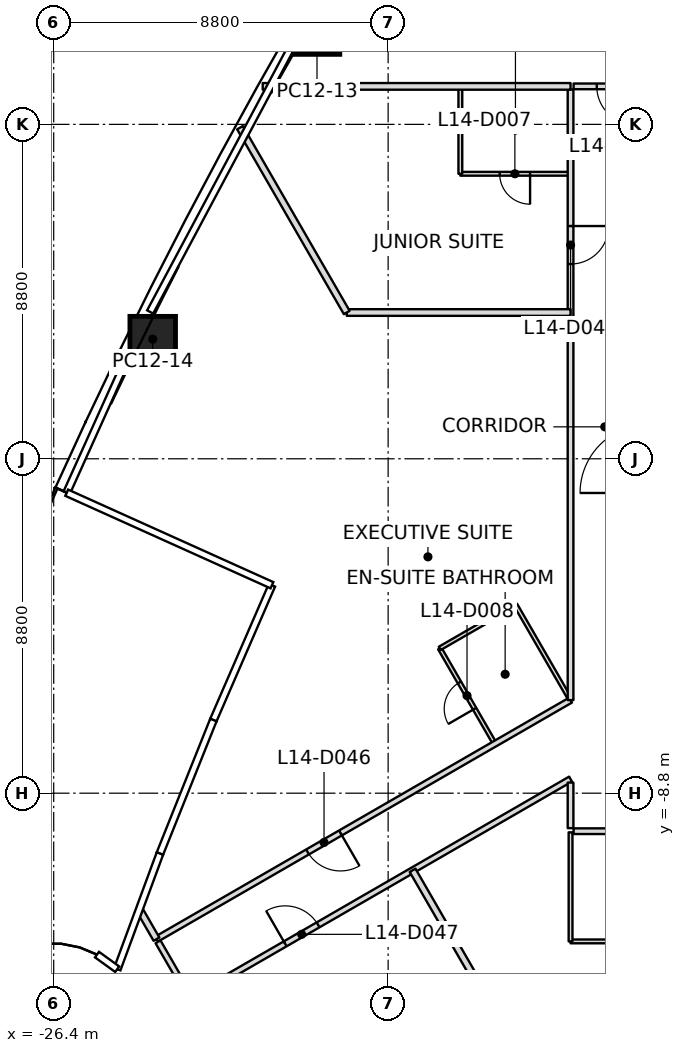
"""IFC4 building model, lengths in metres.
Left out: names, types, materials, properties, quantities, classifications, styles, units other than length and angle.
Written with IfcOpenShell. Run it as: python <this file> out.ifc"""

import sys

from ifc_helpers import new_model, si_unit, direction, frame, frame_2d, origin, origin_2d, place, context, subcontext, project, spatial, rectangle, extrude, element, fill, save


model = new_model("IFC4")
c1 = context("Model", 3, precision=1e-05, world=origin(), true_north=direction((0.0, 1.0)))
c2 = subcontext(c1, "Body", "Model", "MODEL_VIEW")
j1 = project(units=[si_unit("LENGTHUNIT", "METRE"), si_unit("PLANEANGLEUNIT", "RADIAN")], contexts=[c1])
p1 = place(None, origin())
s1 = spatial("IfcSite", under=j1, at=p1, CompositionType="ELEMENT")
p2 = place(p1, origin())
s2 = spatial("IfcBuilding", under=s1, at=p2, CompositionType="ELEMENT")
p3 = place(p2, frame((0.0, 0.0, 73.9)))
s3 = spatial("IfcBuildingStorey", under=s2, at=p3, CompositionType="ELEMENT", Elevation=73.9)
p4 = place(p3, frame((-19.472, 11.242, 0.0), z_axis=(0.010688020009, -0.006201690622, 0.999923649716), x_axis=(0.499971440741, 0.866041891424, 2.7221193e-05)))
e1 = element("IfcColumn", 1, at=p4, inside=s3, PredefinedType="COLUMN", context=c2, shape_type="SweptSolid", body=[
    extrude(rectangle(XDim=1.2, YDim=1.2, at=origin_2d()), origin(), (0.0, 0.0, 1.0), 3.7),
])
p5 = place(p3, frame((-23.795, 3.148, 0.0), z_axis=(0.015371594408, 0.002243065278, 0.999879334092), x_axis=(0.441566424908, 0.897185395141, -0.008801087387)))
e2 = element("IfcColumn", 2, at=p5, inside=s3, PredefinedType="COLUMN", context=c2, shape_type="SweptSolid", body=[
    extrude(rectangle(XDim=1.2, YDim=1.2, at=origin_2d()), origin(), (0.0, 0.0, 1.0), 3.701),
])
p6 = place(p3, frame((-23.695, -12.641, 0.0), z_axis=(0.0, 0.0, 1.0), x_axis=(-0.500122219575, 0.86595482878, 0.0)))
e3 = element("IfcWall", 3, at=p6, inside=s3, PredefinedType="PARTITIONING", context=c2, shape_type="SweptSolid", body=[
    extrude(rectangle(XDim=0.916, YDim=0.175, at=frame_2d((0.458, 0.0))), origin(), (0.0, 0.0, 1.0), 3.15),
])
p7 = place(p3, frame((-12.8, 3.849, 0.0), z_axis=(0.0, 0.0, 1.0), x_axis=(-1.0, 0.0, 0.0)))
e4 = element("IfcWall", 4, at=p7, inside=s3, PredefinedType="PARTITIONING", context=c2, shape_type="SweptSolid", body=[
    extrude(rectangle(XDim=5.889, YDim=0.175, at=frame_2d((2.944, 0.0))), origin(), (0.0, 0.0, 1.0), 3.017),
])
p8 = place(p3, frame((-18.689, 3.849, 0.0), z_axis=(0.0, 0.0, 1.0), x_axis=(-0.49999586752, 0.86602778966, 0.0)))
e5 = element("IfcWall", 5, at=p8, inside=s3, PredefinedType="PARTITIONING", context=c2, shape_type="SweptSolid", body=[
    extrude(rectangle(XDim=5.617, YDim=0.175, at=frame_2d((2.808, 0.0))), origin(), (0.0, 0.0, 1.0), 2.934),
])
p9 = place(p3, frame((-12.8, 9.8, 0.0), z_axis=(0.0, 0.0, 1.0), x_axis=(-1.0, 0.0, 0.0)))
e6 = element("IfcWall", 6, at=p9, inside=s3, PredefinedType="PARTITIONING", context=c2, shape_type="SweptSolid", body=[
    extrude(rectangle(XDim=8.1, YDim=0.175, at=frame_2d((4.05, 0.0))), origin(), (0.0, 0.0, 1.0), 2.934),
])
p10 = place(p3, frame((-13.655, -16.549, 0.0), z_axis=(0.0, 0.0, 1.0), x_axis=(-0.499999794657, 0.866025522339, 0.0)))
e7 = element("IfcWall", 7, at=p10, inside=s3, PredefinedType="PARTITIONING", context=c2, shape_type="SweptSolid", body=[
    extrude(rectangle(XDim=6.604, YDim=0.175, at=frame_2d((3.302, 0.0))), origin(), (0.0, 0.0, 1.0), 2.797),
])
p11 = place(p3, frame((-12.8, -6.351, 0.0), z_axis=(0.0, 0.0, 1.0), x_axis=(-0.866020449901, -0.50000858028, 0.0)))
e8 = element("IfcWall", 8, at=p11, inside=s3, PredefinedType="PARTITIONING", context=c2, shape_type="SweptSolid", body=[
    extrude(rectangle(XDim=12.581, YDim=0.15, at=frame_2d((6.291, 0.0))), origin(), (0.0, 0.0, 1.0), 2.947),
])
p12 = place(p11, frame((6.99, 0.0, 0.0)))
e9 = element("IfcOpeningElement", 9, at=p12, cuts=e8, PredefinedType="OPENING", context=c2, shape_type="SweptSolid", body=[
    extrude(rectangle(XDim=1.0, YDim=2.1, at=frame_2d((0.5, 1.05))), frame((0.0, 0.075, 0.0), z_axis=(0.0, -1.0, 0.0), x_axis=(1.0, 0.0, 0.0)), (0.0, 0.0, 1.0), 0.15),
])
p13 = place(p3, frame((-23.656, -12.711, 0.0), z_axis=(0.0, 0.0, 1.0), x_axis=(0.500062383118, -0.865989383878, 0.0)))
e10 = element("IfcWall", 10, at=p13, inside=s3, PredefinedType="PARTITIONING", context=c2, shape_type="SweptSolid", body=[
    extrude(rectangle(XDim=1.72, YDim=0.15, at=frame_2d((0.86, 0.0))), origin(), (0.0, 0.0, 1.0), 2.797),
])
p14 = place(p3, frame((-22.726, -14.16, 0.0), z_axis=(0.0, 0.0, 1.0), x_axis=(0.866019223041, 0.500010705209, 0.0)))
e11 = element("IfcWall", 11, at=p14, inside=s3, PredefinedType="PARTITIONING", context=c2, shape_type="SweptSolid", body=[
    extrude(rectangle(XDim=11.462, YDim=0.15, at=frame_2d((5.731, 0.0))), origin(), (0.0, 0.0, 1.0), 2.797),
])
p15 = place(p14, frame((2.791, 0.0, 0.0)))
e12 = element("IfcOpeningElement", 12, at=p15, cuts=e11, PredefinedType="OPENING", context=c2, shape_type="SweptSolid", body=[
    extrude(rectangle(XDim=1.0, YDim=2.1, at=frame_2d((0.5, 1.05))), frame((0.0, 0.075, 0.0), z_axis=(0.0, -1.0, 0.0), x_axis=(1.0, 0.0, 0.0)), (0.0, 0.0, 1.0), 0.15),
])
p16 = place(p3, frame((-12.8, -8.521, 0.0), z_axis=(0.0, 0.0, 1.0), x_axis=(0.0, -1.0, 0.0)))
e13 = element("IfcWall", 13, at=p16, inside=s3, PredefinedType="PARTITIONING", context=c2, shape_type="SweptSolid", body=[
    extrude(rectangle(XDim=1.199, YDim=0.15, at=frame_2d((0.6, 0.0))), origin(), (0.0, 0.0, 1.0), 2.797),
])
p17 = place(p3, frame((-12.8, 9.72, 0.0), z_axis=(0.0, 0.0, 1.0), x_axis=(0.0, -1.0, 0.0)))
e14 = element("IfcWall", 14, at=p17, inside=s3, PredefinedType="PARTITIONING", context=c2, shape_type="SweptSolid", body=[
    extrude(rectangle(XDim=16.071, YDim=0.15, at=frame_2d((8.035, 0.0))), origin(), (0.0, 0.0, 1.0), 2.947),
])
p18 = place(p17, frame((3.595, 0.0, 0.0)))
e15 = element("IfcOpeningElement", 15, at=p18, cuts=e14, PredefinedType="OPENING", context=c2, shape_type="SweptSolid", body=[
    extrude(rectangle(XDim=1.0, YDim=2.1, at=frame_2d((0.5, 1.05))), frame((0.0, 0.075, 0.0), z_axis=(0.0, -1.0, 0.0), x_axis=(1.0, 0.0, 0.0)), (0.0, 0.0, 1.0), 0.15),
])
p19 = place(p3, frame((-12.72, -9.8, 0.0), z_axis=(0.0, 0.0, 1.0), x_axis=(1.0, 0.0, 0.0)))
e16 = element("IfcWall", 16, at=p19, inside=s3, PredefinedType="PARTITIONING", context=c2, shape_type="SweptSolid", body=[
    extrude(rectangle(XDim=25.44, YDim=0.15, at=frame_2d((12.72, 0.0))), origin(), (0.0, 0.0, 1.0), 2.947),
])
p20 = place(p19, frame((3.22, 0.0, 0.0)))
e17 = element("IfcOpeningElement", 17, at=p20, cuts=e16, PredefinedType="OPENING", context=c2, shape_type="SweptSolid", body=[
    extrude(rectangle(XDim=1.0, YDim=2.1, at=frame_2d((0.5, 1.05))), frame((0.0, 0.075, 0.0), z_axis=(0.0, -1.0, 0.0), x_axis=(1.0, 0.0, 0.0)), (0.0, 0.0, 1.0), 0.15),
])
p21 = place(p19, frame((8.22, 0.0, 0.0)))
e18 = element("IfcOpeningElement", 18, at=p21, cuts=e16, PredefinedType="OPENING", context=c2, shape_type="SweptSolid", body=[
    extrude(rectangle(XDim=1.0, YDim=2.1, at=frame_2d((0.5, 1.05))), frame((0.0, 0.075, 0.0), z_axis=(0.0, -1.0, 0.0), x_axis=(1.0, 0.0, 0.0)), (0.0, 0.0, 1.0), 0.15),
])
p22 = place(p19, frame((13.32, 0.0, 0.0)))
e19 = element("IfcOpeningElement", 19, at=p22, cuts=e16, PredefinedType="OPENING", context=c2, shape_type="SweptSolid", body=[
    extrude(rectangle(XDim=1.0, YDim=2.1, at=frame_2d((0.5, 1.05))), frame((0.0, 0.075, 0.0), z_axis=(0.0, -1.0, 0.0), x_axis=(1.0, 0.0, 0.0)), (0.0, 0.0, 1.0), 0.15),
])
p23 = place(p19, frame((18.72, 0.0, 0.0)))
e20 = element("IfcOpeningElement", 20, at=p23, cuts=e16, PredefinedType="OPENING", context=c2, shape_type="SweptSolid", body=[
    extrude(rectangle(XDim=1.0, YDim=2.1, at=frame_2d((0.5, 1.05))), frame((0.0, 0.075, 0.0), z_axis=(0.0, -1.0, 0.0), x_axis=(1.0, 0.0, 0.0)), (0.0, 0.0, 1.0), 0.15),
])
p24 = place(p19, frame((23.82, 0.0, 0.0)))
e21 = element("IfcOpeningElement", 21, at=p24, cuts=e16, PredefinedType="OPENING", context=c2, shape_type="SweptSolid", body=[
    extrude(rectangle(XDim=1.0, YDim=2.1, at=frame_2d((0.5, 1.05))), frame((0.0, 0.075, 0.0), z_axis=(0.0, -1.0, 0.0), x_axis=(1.0, 0.0, 0.0)), (0.0, 0.0, 1.0), 0.15),
])
p25 = place(p3, frame((-2.68, 9.8, 0.0), z_axis=(0.0, 0.0, 1.0), x_axis=(-1.0, 0.0, 0.0)))
e22 = element("IfcWall", 22, at=p25, inside=s3, PredefinedType="PARTITIONING", context=c2, shape_type="SweptSolid", body=[
    extrude(rectangle(XDim=10.04, YDim=0.15, at=frame_2d((5.02, 0.0))), origin(), (0.0, 0.0, 1.0), 2.947),
])
p26 = place(p25, frame((8.43, 0.0, 0.0)))
e23 = element("IfcOpeningElement", 23, at=p26, cuts=e22, PredefinedType="OPENING", context=c2, shape_type="SweptSolid", body=[
    extrude(rectangle(XDim=1.0, YDim=2.1, at=frame_2d((0.5, 1.05))), frame((0.0, 0.075, 0.0), z_axis=(0.0, -1.0, 0.0), x_axis=(1.0, 0.0, 0.0)), (0.0, 0.0, 1.0), 0.15),
])
p27 = place(p3, frame((-12.83, 7.5, 0.0), z_axis=(0.0, 0.0, 1.0), x_axis=(-1.0, 0.0, 0.0)))
e24 = element("IfcWall", 24, at=p27, inside=s3, PredefinedType="PARTITIONING", context=c2, shape_type="SweptSolid", body=[
    extrude(rectangle(XDim=2.87, YDim=0.1, at=frame_2d((1.435, 0.0))), origin(), (0.0, 0.0, 1.0), 3.15),
])
p28 = place(p27, frame((1.035, 0.0, 0.0)))
e25 = element("IfcOpeningElement", 25, at=p28, cuts=e24, PredefinedType="OPENING", context=c2, shape_type="SweptSolid", body=[
    extrude(rectangle(XDim=0.8, YDim=2.1, at=frame_2d((0.4, 1.05))), frame((0.0, 0.05, 0.0), z_axis=(0.0, -1.0, 0.0), x_axis=(1.0, 0.0, 0.0)), (0.0, 0.0, 1.0), 0.1),
])
p29 = place(p3, frame((-15.7, 7.5, 0.0), z_axis=(0.0, 0.0, 1.0), x_axis=(0.0, 1.0, 0.0)))
e26 = element("IfcWall", 26, at=p29, inside=s3, PredefinedType="PARTITIONING", context=c2, shape_type="SweptSolid", body=[
    extrude(rectangle(XDim=2.27, YDim=0.1, at=frame_2d((1.135, 0.0))), origin(), (0.0, 0.0, 1.0), 3.15),
])
p30 = place(p3, frame((-14.807, -7.475, 0.0), z_axis=(0.0, 0.0, 1.0), x_axis=(-0.500036638401, 0.866004249561, 0.0)))
e27 = element("IfcWall", 27, at=p30, inside=s3, PredefinedType="PARTITIONING", context=c2, shape_type="SweptSolid", body=[
    extrude(rectangle(XDim=2.87, YDim=0.1, at=frame_2d((1.435, 0.0))), origin(), (0.0, 0.0, 1.0), 3.15),
])
p31 = place(p30, frame((1.035, 0.0, 0.0)))
e28 = element("IfcOpeningElement", 28, at=p31, cuts=e27, PredefinedType="OPENING", context=c2, shape_type="SweptSolid", body=[
    extrude(rectangle(XDim=0.8, YDim=2.1, at=frame_2d((0.4, 1.05))), frame((0.0, 0.05, 0.0), z_axis=(0.0, -1.0, 0.0), x_axis=(1.0, 0.0, 0.0)), (0.0, 0.0, 1.0), 0.1),
])
p32 = place(p3, frame((-16.242, -4.99, 0.0), z_axis=(0.0, 0.0, 1.0), x_axis=(0.866007057882, 0.500031774688, 0.0)))
e29 = element("IfcWall", 29, at=p32, inside=s3, PredefinedType="PARTITIONING", context=c2, shape_type="SweptSolid", body=[
    extrude(rectangle(XDim=2.3, YDim=0.1, at=frame_2d((1.15, 0.0))), origin(), (0.0, 0.0, 1.0), 2.947),
])
p33 = place(p3, frame((-14.25, -3.839, 0.0), z_axis=(0.0, 0.0, 1.0), x_axis=(0.499985389037, -0.866033839264, 0.0)))
e30 = element("IfcWall", 30, at=p33, inside=s3, PredefinedType="PARTITIONING", context=c2, shape_type="SweptSolid", body=[
    extrude(rectangle(XDim=2.84, YDim=0.1, at=frame_2d((1.42, 0.0))), origin(), (0.0, 0.0, 1.0), 2.947),
])
p34 = place(p3, frame((-10.5, -12.7, 0.0), z_axis=(0.0, 0.0, 1.0), x_axis=(-1.0, 0.0, 0.0)))
e31 = element("IfcWall", 31, at=p34, inside=s3, PredefinedType="PARTITIONING", context=c2, shape_type="SweptSolid", body=[
    extrude(rectangle(XDim=2.3, YDim=0.1, at=frame_2d((1.15, 0.0))), origin(), (0.0, 0.0, 1.0), 3.017),
])
p35 = place(p3, frame((-12.8, -12.7, 0.0), z_axis=(0.0, 0.0, 1.0), x_axis=(0.0, 1.0, 0.0)))
e32 = element("IfcWall", 32, at=p35, inside=s3, PredefinedType="PARTITIONING", context=c2, shape_type="SweptSolid", body=[
    extrude(rectangle(XDim=2.87, YDim=0.1, at=frame_2d((1.435, 0.0))), origin(), (0.0, 0.0, 1.0), 3.15),
])
p36 = place(p26, origin())
e33 = element("IfcDoor", 33, at=p36, inside=s3, OperationType="SINGLE_SWING_LEFT", PredefinedType="DOOR", context=c2, shape_type="SweptSolid", body=[
    extrude(rectangle(XDim=1.0, YDim=2.1, at=frame_2d((0.5, 1.05))), frame((0.0, 0.025, 0.0), z_axis=(0.0, -1.0, 0.0), x_axis=(1.0, 0.0, 0.0)), (0.0, 0.0, 1.0), 0.05),
])
fill(e23, e33)
p37 = place(p18, origin())
e34 = element("IfcDoor", 34, at=p37, inside=s3, OperationType="SINGLE_SWING_LEFT", PredefinedType="DOOR", context=c2, shape_type="SweptSolid", body=[
    extrude(rectangle(XDim=1.0, YDim=2.1, at=frame_2d((0.5, 1.05))), frame((0.0, 0.025, 0.0), z_axis=(0.0, -1.0, 0.0), x_axis=(1.0, 0.0, 0.0)), (0.0, 0.0, 1.0), 0.05),
])
fill(e15, e34)
p38 = place(p28, origin())
e35 = element("IfcDoor", 35, at=p38, inside=s3, OperationType="SINGLE_SWING_RIGHT", PredefinedType="DOOR", context=c2, shape_type="SweptSolid", body=[
    extrude(rectangle(XDim=0.8, YDim=2.1, at=frame_2d((0.4, 1.05))), frame((0.0, 0.025, 0.0), z_axis=(0.0, -1.0, 0.0), x_axis=(1.0, 0.0, 0.0)), (0.0, 0.0, 1.0), 0.05),
])
fill(e25, e35)
p39 = place(p12, origin())
e36 = element("IfcDoor", 36, at=p39, inside=s3, OperationType="SINGLE_SWING_RIGHT", PredefinedType="DOOR", context=c2, shape_type="SweptSolid", body=[
    extrude(rectangle(XDim=1.0, YDim=2.1, at=frame_2d((0.5, 1.05))), frame((0.0, 0.025, 0.0), z_axis=(0.0, -1.0, 0.0), x_axis=(1.0, 0.0, 0.0)), (0.0, 0.0, 1.0), 0.05),
])
fill(e9, e36)
p40 = place(p31, origin())
e37 = element("IfcDoor", 37, at=p40, inside=s3, OperationType="SINGLE_SWING_RIGHT", PredefinedType="DOOR", context=c2, shape_type="SweptSolid", body=[
    extrude(rectangle(XDim=0.8, YDim=2.1, at=frame_2d((0.4, 1.05))), frame((0.0, 0.025, 0.0), z_axis=(0.0, -1.0, 0.0), x_axis=(1.0, 0.0, 0.0)), (0.0, 0.0, 1.0), 0.05),
])
fill(e28, e37)
p41 = place(p15, origin())
e38 = element("IfcDoor", 38, at=p41, inside=s3, OperationType="SINGLE_SWING_LEFT", PredefinedType="DOOR", context=c2, shape_type="SweptSolid", body=[
    extrude(rectangle(XDim=1.0, YDim=2.1, at=frame_2d((0.5, 1.05))), frame((0.0, 0.025, 0.0), z_axis=(0.0, -1.0, 0.0), x_axis=(1.0, 0.0, 0.0)), (0.0, 0.0, 1.0), 0.05),
])
fill(e12, e38)
save(model, sys.argv[1])
